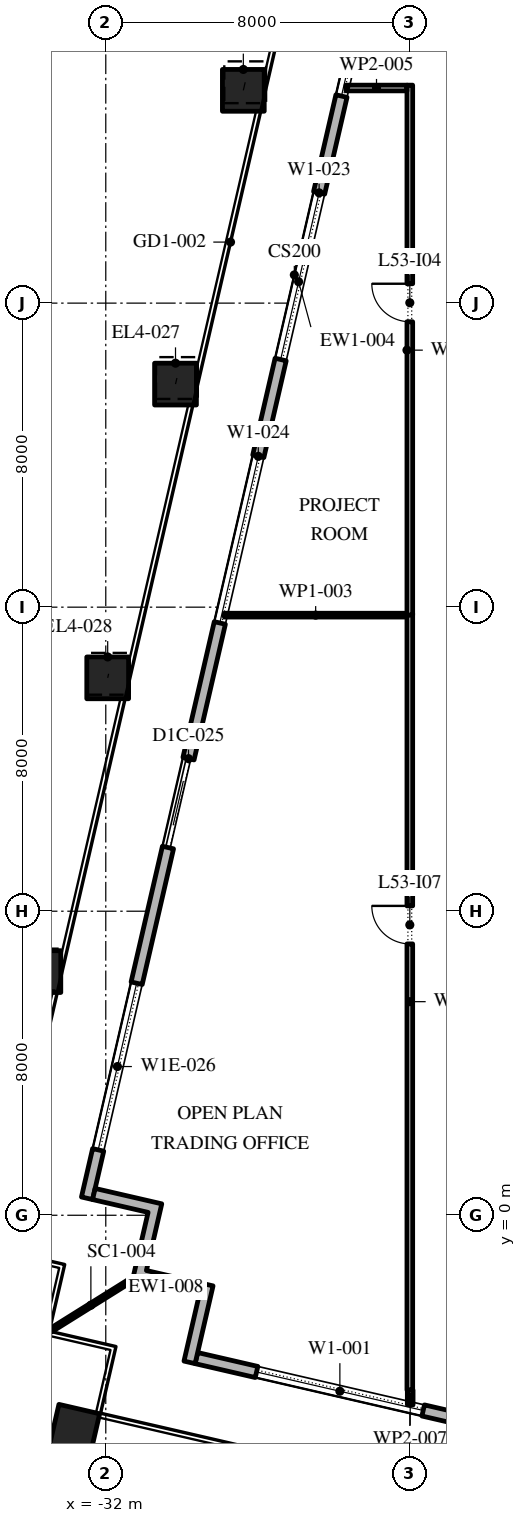
"""IFC4 building model, lengths in metres.
Left out: names, types, materials, properties, quantities, classifications, styles, units other than length and angle.
Written with IfcOpenShell. Run it as: python <this file> out.ifc"""

import sys

from ifc_helpers import new_model, si_unit, direction, frame, frame_2d, origin, origin_2d, place, context, subcontext, project, spatial, polyline, rectangle, outline, extrude, element, fill, save


model = new_model("IFC4")
c1 = context("Model", 3, precision=1e-05, world=origin(), true_north=direction((0.0, 1.0)))
c2 = subcontext(c1, "Body", "Model", "MODEL_VIEW")
j1 = project(units=[si_unit("LENGTHUNIT", "METRE"), si_unit("PLANEANGLEUNIT", "RADIAN")], contexts=[c1])
p1 = place(None, origin())
s1 = spatial("IfcSite", under=j1, at=p1, CompositionType="ELEMENT")
p2 = place(p1, origin())
s2 = spatial("IfcBuilding", under=s1, at=p2, CompositionType="ELEMENT")
p3 = place(p2, frame((0.0, 0.0, 247.2)))
s3 = spatial("IfcBuildingStorey", under=s2, at=p3, CompositionType="ELEMENT", Elevation=247.2)
p4 = place(p3, frame((-32.821, -5.635, 0.0), z_axis=(0.0, 0.0, 1.0), x_axis=(0.974370064785, -0.224951054344, 0.0)))
e1 = element("IfcColumn", 1, at=p4, inside=s3, PredefinedType="COLUMN", context=c2, shape_type="SweptSolid", body=[
    extrude(rectangle(XDim=1.1, YDim=1.1, at=origin_2d()), origin(), (0.0, 0.0, 1.0), 4.2),
])
p5 = place(p3, frame((-28.381, 29.599, 0.0), z_axis=(0.011668267153, 0.050562490995, 0.998652735462), x_axis=(-0.974391195695, 0.224859506699, 0.0)))
e2 = element("IfcColumn", 2, at=p5, inside=s3, PredefinedType="COLUMN", context=c2, shape_type="SweptSolid", body=[
    extrude(rectangle(XDim=1.1, YDim=1.1, at=origin_2d()), origin(), (0.0, 0.0, 1.0), 4.206),
])
p6 = place(p3, frame((-30.165, 21.869, 0.0), z_axis=(0.008770884695, 0.037929719907, 0.99924191662), x_axis=(-0.974290512438, 0.225295355862, 0.0)))
e3 = element("IfcColumn", 3, at=p6, inside=s3, PredefinedType="COLUMN", context=c2, shape_type="SweptSolid", body=[
    extrude(rectangle(XDim=1.1, YDim=1.1, at=origin_2d()), origin(), (0.0, 0.0, 1.0), 4.203),
])
p7 = place(p3, frame((-31.95, 14.14, 0.0), z_axis=(0.005869091843, 0.025277771797, 0.999663237302), x_axis=(-0.974088391429, 0.226167649504, 0.0)))
e4 = element("IfcColumn", 4, at=p7, inside=s3, PredefinedType="COLUMN", context=c2, shape_type="SweptSolid", body=[
    extrude(rectangle(XDim=1.1, YDim=1.1, at=origin_2d()), origin(), (0.0, 0.0, 1.0), 4.201),
])
p8 = place(p3, frame((-33.734, 6.411, 0.0), z_axis=(0.002906224189, 0.012671137464, 0.999915494498), x_axis=(-0.974691740237, 0.22355315143, 0.0)))
e5 = element("IfcColumn", 5, at=p8, inside=s3, PredefinedType="COLUMN", context=c2, shape_type="SweptSolid", body=[
    extrude(rectangle(XDim=1.1, YDim=1.1, at=origin_2d()), origin(), (0.0, 0.0, 1.0), 4.2),
])
p9 = place(p3, frame((-29.616, -3.758, 0.0), z_axis=(0.0, 0.0, 1.0), x_axis=(0.974370532314, -0.224949029246, 0.0)))
e6 = element("IfcWall", 6, at=p9, inside=s3, PredefinedType="STANDARD", context=c2, shape_type="SweptSolid", body=[
    extrude(rectangle(XDim=48.0, YDim=0.3, at=frame_2d((24.0, 0.0))), origin(), (0.0, 0.0, 1.0), 4.0),
])
p10 = place(p9, frame((1.625, 0.0, 0.45)))
e7 = element("IfcOpeningElement", 7, at=p10, cuts=e6, PredefinedType="OPENING", context=c2, shape_type="SweptSolid", body=[
    extrude(rectangle(XDim=4.5, YDim=3.05, at=frame_2d((2.25, 1.525))), frame((0.0, 0.16, 0.0), z_axis=(0.0, -1.0, 0.0), x_axis=(1.0, 0.0, 0.0)), (0.0, 0.0, 1.0), 0.32),
])
p11 = place(p9, frame((10.575, 0.0, 0.0)))
e8 = element("IfcOpeningElement", 8, at=p11, cuts=e6, PredefinedType="OPENING", context=c2, shape_type="SweptSolid", body=[
    extrude(rectangle(XDim=2.4, YDim=3.5, at=frame_2d((1.2, 1.75))), frame((0.0, 0.16, 0.0), z_axis=(0.0, -1.0, 0.0), x_axis=(1.0, 0.0, 0.0)), (0.0, 0.0, 1.0), 0.32),
])
p12 = place(p9, frame((17.575, 0.0, 0.45)))
e9 = element("IfcOpeningElement", 9, at=p12, cuts=e6, PredefinedType="OPENING", context=c2, shape_type="SweptSolid", body=[
    extrude(rectangle(XDim=4.5, YDim=3.0, at=frame_2d((2.25, 1.5))), frame((0.0, 0.16, 0.0), z_axis=(0.0, -1.0, 0.0), x_axis=(1.0, 0.0, 0.0)), (0.0, 0.0, 1.0), 0.32),
])
p13 = place(p9, frame((25.625, 0.0, 0.45)))
e10 = element("IfcOpeningElement", 10, at=p13, cuts=e6, PredefinedType="OPENING", context=c2, shape_type="SweptSolid", body=[
    extrude(rectangle(XDim=4.5, YDim=3.05, at=frame_2d((2.25, 1.525))), frame((0.0, 0.16, 0.0), z_axis=(0.0, -1.0, 0.0), x_axis=(1.0, 0.0, 0.0)), (0.0, 0.0, 1.0), 0.32),
])
p14 = place(p9, frame((33.675, 0.0, 0.45)))
e11 = element("IfcOpeningElement", 11, at=p14, cuts=e6, PredefinedType="OPENING", context=c2, shape_type="SweptSolid", body=[
    extrude(rectangle(XDim=4.5, YDim=2.825, at=frame_2d((2.25, 1.413))), frame((0.0, 0.16, 0.0), z_axis=(0.0, -1.0, 0.0), x_axis=(1.0, 0.0, 0.0)), (0.0, 0.0, 1.0), 0.32),
])
p15 = place(p9, frame((42.775, 0.0, 0.0)))
e12 = element("IfcOpeningElement", 12, at=p15, cuts=e6, PredefinedType="OPENING", context=c2, shape_type="SweptSolid", body=[
    extrude(rectangle(XDim=2.4, YDim=3.5, at=frame_2d((1.2, 1.75))), frame((0.0, 0.16, 0.0), z_axis=(0.0, -1.0, 0.0), x_axis=(1.0, 0.0, 0.0)), (0.0, 0.0, 1.0), 0.32),
])
p16 = place(p3, frame((-21.359, 48.678, 0.0), z_axis=(0.0, 0.0, 1.0), x_axis=(-0.224949198343, -0.974370493275, 0.0)))
e13 = element("IfcWall", 13, at=p16, inside=s3, PredefinedType="STANDARD", context=c2, shape_type="SweptSolid", body=[
    extrude(rectangle(XDim=49.5, YDim=0.3, at=frame_2d((24.75, 0.0))), origin(), (0.0, 0.0, 1.0), 4.0),
])
p17 = place(p16, frame((1.157, 0.0, 0.45)))
e14 = element("IfcOpeningElement", 14, at=p17, cuts=e13, PredefinedType="OPENING", context=c2, shape_type="SweptSolid", body=[
    extrude(rectangle(XDim=4.5, YDim=3.05, at=frame_2d((2.25, 1.525))), frame((0.0, 0.16, 0.0), z_axis=(0.0, -1.0, 0.0), x_axis=(1.0, 0.0, 0.0)), (0.0, 0.0, 1.0), 0.32),
])
p18 = place(p16, frame((9.171, 0.0, 0.0)))
e15 = element("IfcOpeningElement", 15, at=p18, cuts=e13, PredefinedType="OPENING", context=c2, shape_type="SweptSolid", body=[
    extrude(rectangle(XDim=2.4, YDim=3.5, at=frame_2d((1.2, 1.75))), frame((0.0, 0.16, 0.0), z_axis=(0.0, -1.0, 0.0), x_axis=(1.0, 0.0, 0.0)), (0.0, 0.0, 1.0), 0.32),
])
p19 = place(p16, frame((15.236, 0.0, 0.45)))
e16 = element("IfcOpeningElement", 16, at=p19, cuts=e13, PredefinedType="OPENING", context=c2, shape_type="SweptSolid", body=[
    extrude(rectangle(XDim=4.5, YDim=3.05, at=frame_2d((2.25, 1.525))), frame((0.0, 0.16, 0.0), z_axis=(0.0, -1.0, 0.0), x_axis=(1.0, 0.0, 0.0)), (0.0, 0.0, 1.0), 0.32),
])
p20 = place(p16, frame((22.35, 0.0, 0.45)))
e17 = element("IfcOpeningElement", 17, at=p20, cuts=e13, PredefinedType="OPENING", context=c2, shape_type="SweptSolid", body=[
    extrude(rectangle(XDim=4.5, YDim=3.05, at=frame_2d((2.25, 1.525))), frame((0.0, 0.16, 0.0), z_axis=(0.0, -1.0, 0.0), x_axis=(1.0, 0.0, 0.0)), (0.0, 0.0, 1.0), 0.32),
])
p21 = place(p16, frame((29.464, 0.0, 0.45)))
e18 = element("IfcOpeningElement", 18, at=p21, cuts=e13, PredefinedType="OPENING", context=c2, shape_type="SweptSolid", body=[
    extrude(rectangle(XDim=4.5, YDim=3.05, at=frame_2d((2.25, 1.525))), frame((0.0, 0.16, 0.0), z_axis=(0.0, -1.0, 0.0), x_axis=(1.0, 0.0, 0.0)), (0.0, 0.0, 1.0), 0.32),
])
p22 = place(p16, frame((37.628, 0.0, 0.0)))
e19 = element("IfcOpeningElement", 19, at=p22, cuts=e13, PredefinedType="OPENING", context=c2, shape_type="SweptSolid", body=[
    extrude(rectangle(XDim=2.4, YDim=3.325, at=frame_2d((1.2, 1.663))), frame((0.0, 0.16, 0.0), z_axis=(0.0, -1.0, 0.0), x_axis=(1.0, 0.0, 0.0)), (0.0, 0.0, 1.0), 0.32),
])
p23 = place(p16, frame((43.693, 0.0, 0.45)))
e20 = element("IfcOpeningElement", 20, at=p23, cuts=e13, PredefinedType="OPENING", context=c2, shape_type="SweptSolid", body=[
    extrude(rectangle(XDim=4.5, YDim=2.825, at=frame_2d((2.25, 1.413))), frame((0.0, 0.16, 0.0), z_axis=(0.0, -1.0, 0.0), x_axis=(1.0, 0.0, 0.0)), (0.0, 0.0, 1.0), 0.32),
])
p24 = place(p3, origin())
e21 = element("IfcWall", 21, at=p24, inside=s3, PredefinedType="STANDARD", context=c2, shape_type="SweptSolid", body=[
    extrude(outline(polyline([(-31.291, -1.678), (-30.886, 0.076), (-32.348, 0.413), (-32.28, 0.705), (-30.526, 0.301), (-30.931, -1.453), (-29.177, -1.858), (-29.65, -3.905), (-29.942, -3.837), (-29.537, -2.083), (-31.291, -1.678)])), origin(), (0.0, 0.0, 1.0), 4.0),
])
p25 = place(p3, frame((-31.291, -1.678, -0.05), z_axis=(0.0, 0.0, 1.0), x_axis=(-0.84807753525, -0.529872148923, 0.0)))
e22 = element("IfcWall", 22, at=p25, inside=s3, PredefinedType="STANDARD", context=c2, shape_type="SweptSolid", body=[
    extrude(rectangle(XDim=2.596, YDim=0.1, at=frame_2d((1.298, 0.0))), origin(), (0.0, 0.0, 1.0), 4.05),
])
p26 = place(p3, frame((-24.0, -4.6, 0.0), z_axis=(0.0, 0.0, 1.0), x_axis=(0.0, 1.0, 0.0)))
e23 = element("IfcWall", 23, at=p26, inside=s3, PredefinedType="PARTITIONING", context=c2, shape_type="SweptSolid", body=[
    extrude(rectangle(XDim=20.44, YDim=0.15, at=frame_2d((10.22, 0.0))), origin(), (0.0, 0.0, 1.0), 4.0),
])
p27 = place(p26, frame((11.74, 0.0, 0.0)))
e24 = element("IfcOpeningElement", 24, at=p27, cuts=e23, PredefinedType="OPENING", context=c2, shape_type="SweptSolid", body=[
    extrude(rectangle(XDim=1.0, YDim=2.1, at=frame_2d((0.5, 1.05))), frame((0.0, 0.085, 0.0), z_axis=(0.0, -1.0, 0.0), x_axis=(1.0, 0.0, 0.0)), (0.0, 0.0, 1.0), 0.17),
])
p28 = place(p3, frame((-24.075, 15.79, 0.0), z_axis=(0.0, 0.0, 1.0), x_axis=(-1.0, 0.0, 0.0)))
e25 = element("IfcWall", 25, at=p28, inside=s3, PredefinedType="PARTITIONING", context=c2, shape_type="SweptSolid", body=[
    extrude(rectangle(XDim=4.805, YDim=0.1, at=frame_2d((2.402, 0.0))), origin(), (0.0, 0.0, 1.0), 4.0),
])
p29 = place(p3, frame((-24.0, 15.79, 0.0), z_axis=(0.0, 0.0, 1.0), x_axis=(0.0, 1.0, 0.0)))
e26 = element("IfcWall", 26, at=p29, inside=s3, PredefinedType="PARTITIONING", context=c2, shape_type="SweptSolid", body=[
    extrude(rectangle(XDim=13.945, YDim=0.15, at=frame_2d((6.973, 0.0))), origin(), (0.0, 0.0, 1.0), 4.0),
])
p30 = place(p29, frame((7.72, 0.0, 0.0)))
e27 = element("IfcOpeningElement", 27, at=p30, cuts=e26, PredefinedType="OPENING", context=c2, shape_type="SweptSolid", body=[
    extrude(rectangle(XDim=1.0, YDim=2.1, at=frame_2d((0.5, 1.05))), frame((0.0, 0.085, 0.0), z_axis=(0.0, -1.0, 0.0), x_axis=(1.0, 0.0, 0.0)), (0.0, 0.0, 1.0), 0.17),
])
p31 = place(p3, frame((-24.075, 29.66, 0.0), z_axis=(0.0, 0.0, 1.0), x_axis=(-1.0, 0.0, 0.0)))
e28 = element("IfcWall", 28, at=p31, inside=s3, PredefinedType="PARTITIONING", context=c2, shape_type="SweptSolid", body=[
    extrude(rectangle(XDim=1.603, YDim=0.15, at=frame_2d((0.802, 0.0))), origin(), (0.0, 0.0, 1.0), 4.0),
])
p32 = place(p3, frame((-23.99, -4.986, 0.0), z_axis=(0.0, 0.0, 1.0), x_axis=(0.0, 1.0, 0.0)))
e29 = element("IfcWall", 29, at=p32, inside=s3, PredefinedType="PARTITIONING", context=c2, shape_type="SweptSolid", body=[
    extrude(rectangle(XDim=0.386, YDim=0.15, at=frame_2d((0.193, 0.0))), origin(), (0.0, 0.0, 1.0), 4.0),
])
p33 = place(p10, origin())
e30 = element("IfcWindow", 30, at=p33, inside=s3, PartitioningType="DOUBLE_PANEL_VERTICAL", PredefinedType="WINDOW", context=c2, shape_type="SweptSolid", body=[
    extrude(rectangle(XDim=4.5, YDim=3.05, at=frame_2d((2.25, 1.525))), frame((0.0, 0.03, 0.0), z_axis=(0.0, -1.0, 0.0), x_axis=(1.0, 0.0, 0.0)), (0.0, 0.0, 1.0), 0.06),
])
fill(e7, e30)
p34 = place(p19, origin())
e31 = element("IfcWindow", 31, at=p34, inside=s3, PartitioningType="DOUBLE_PANEL_VERTICAL", PredefinedType="WINDOW", context=c2, shape_type="SweptSolid", body=[
    extrude(rectangle(XDim=4.5, YDim=3.05, at=frame_2d((2.25, 1.525))), frame((0.0, 0.03, 0.0), z_axis=(0.0, -1.0, 0.0), x_axis=(1.0, 0.0, 0.0)), (0.0, 0.0, 1.0), 0.06),
])
fill(e16, e31)
p35 = place(p20, origin())
e32 = element("IfcWindow", 32, at=p35, inside=s3, PartitioningType="DOUBLE_PANEL_VERTICAL", PredefinedType="WINDOW", context=c2, shape_type="SweptSolid", body=[
    extrude(rectangle(XDim=4.5, YDim=3.05, at=frame_2d((2.25, 1.525))), frame((0.0, 0.03, 0.0), z_axis=(0.0, -1.0, 0.0), x_axis=(1.0, 0.0, 0.0)), (0.0, 0.0, 1.0), 0.06),
])
fill(e17, e32)
p36 = place(p21, origin())
e33 = element("IfcWindow", 33, at=p36, inside=s3, PartitioningType="DOUBLE_PANEL_VERTICAL", PredefinedType="WINDOW", context=c2, shape_type="SweptSolid", body=[
    extrude(rectangle(XDim=4.5, YDim=3.05, at=frame_2d((2.25, 1.525))), frame((0.0, 0.03, 0.0), z_axis=(0.0, -1.0, 0.0), x_axis=(1.0, 0.0, 0.0)), (0.0, 0.0, 1.0), 0.06),
])
fill(e18, e33)
p37 = place(p22, origin())
e34 = element("IfcDoor", 34, at=p37, inside=s3, OperationType="DOUBLE_DOOR_SLIDING", PredefinedType="DOOR", context=c2, shape_type="SweptSolid", body=[
    extrude(rectangle(XDim=2.4, YDim=3.325, at=frame_2d((1.2, 1.663))), frame((0.0, 0.025, 0.0), z_axis=(0.0, -1.0, 0.0), x_axis=(1.0, 0.0, 0.0)), (0.0, 0.0, 1.0), 0.05),
])
fill(e19, e34)
p38 = place(p23, origin())
e35 = element("IfcWindow", 35, at=p38, inside=s3, PartitioningType="DOUBLE_PANEL_VERTICAL", PredefinedType="WINDOW", context=c2, shape_type="SweptSolid", body=[
    extrude(rectangle(XDim=4.5, YDim=2.825, at=frame_2d((2.25, 1.413))), frame((0.0, 0.03, 0.0), z_axis=(0.0, -1.0, 0.0), x_axis=(1.0, 0.0, 0.0)), (0.0, 0.0, 1.0), 0.06),
])
fill(e20, e35)
p39 = place(p30, origin())
e36 = element("IfcDoor", 36, at=p39, inside=s3, OperationType="SINGLE_SWING_LEFT", PredefinedType="DOOR", context=c2, shape_type="SweptSolid", body=[
    extrude(rectangle(XDim=1.0, YDim=2.1, at=frame_2d((0.5, 1.05))), frame((0.0, 0.025, 0.0), z_axis=(0.0, -1.0, 0.0), x_axis=(1.0, 0.0, 0.0)), (0.0, 0.0, 1.0), 0.05),
])
fill(e27, e36)
p40 = place(p27, origin())
e37 = element("IfcDoor", 37, at=p40, inside=s3, OperationType="SINGLE_SWING_LEFT", PredefinedType="DOOR", context=c2, shape_type="SweptSolid", body=[
    extrude(rectangle(XDim=1.0, YDim=2.1, at=frame_2d((0.5, 1.05))), frame((0.0, 0.025, 0.0), z_axis=(0.0, -1.0, 0.0), x_axis=(1.0, 0.0, 0.0)), (0.0, 0.0, 1.0), 0.05),
])
fill(e24, e37)
save(model, sys.argv[1])
